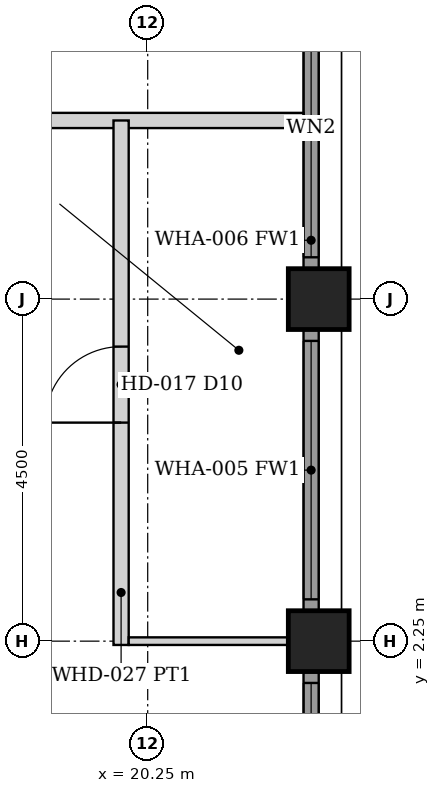
"""IFC4 building model, lengths in metres.
Left out: names, types, materials, properties, quantities, classifications, styles, units other than length and angle.
Written with IfcOpenShell. Run it as: python <this file> out.ifc"""

import sys

from ifc_helpers import new_model, si_unit, direction, frame, frame_2d, origin, origin_2d, place, context, subcontext, project, spatial, rectangle, hollow_rectangle, extrude, element, fill, save


model = new_model("IFC4")
c1 = context("Model", 3, precision=1e-05, world=origin(), true_north=direction((0.0, 1.0)))
c2 = subcontext(c1, "Body", "Model", "MODEL_VIEW")
j1 = project(units=[si_unit("LENGTHUNIT", "METRE"), si_unit("PLANEANGLEUNIT", "RADIAN")], contexts=[c1])
p1 = place(None, origin())
s1 = spatial("IfcSite", under=j1, at=p1, CompositionType="ELEMENT")
p2 = place(p1, origin())
s2 = spatial("IfcBuilding", under=s1, at=p2, CompositionType="ELEMENT")
p3 = place(p2, frame((0.0, 0.0, 150.8)))
s3 = spatial("IfcBuildingStorey", under=s2, at=p3, CompositionType="ELEMENT", Elevation=150.8)
for number, where, z_axis, x_axis in (
    (1, (22.5, 2.25, 0.0), (0.0, 0.0, 1.0), (1.0, 0.0, 0.0)),
    (2, (22.5, 6.75, 0.0), (0.0, 0.0, 1.0), (1.0, 0.0, 0.0)),
):
    element("IfcColumn", number, at=place(p3, frame(where, z_axis=z_axis, x_axis=x_axis)), inside=s3, PredefinedType="COLUMN", context=c2, shape_type="SweptSolid", body=[
        extrude(hollow_rectangle(XDim=0.8, YDim=0.8, WallThickness=0.05, at=origin_2d()), origin(), (0.0, 0.0, 1.0), 3.6),
    ])
p4 = place(p3, frame((22.4, -1.845, 0.0), z_axis=(0.0, 0.0, 1.0), x_axis=(0.0, 1.0, 0.0)))
e3 = element("IfcWall", 3, at=p4, inside=s3, PredefinedType="SOLIDWALL", context=c2, shape_type="SweptSolid", body=[
    extrude(rectangle(XDim=3.69, YDim=0.2, at=frame_2d((1.845, 0.0))), origin(), (0.0, 0.0, 1.0), 2.479),
])
p5 = place(p4, frame((0.145, 0.0, 0.3)))
e4 = element("IfcOpeningElement", 4, at=p5, cuts=e3, PredefinedType="OPENING", context=c2, shape_type="SweptSolid", body=[
    extrude(rectangle(XDim=3.4, YDim=2.029, at=frame_2d((1.7, 1.015))), frame((0.0, 0.11, 0.0), z_axis=(0.0, -1.0, 0.0), x_axis=(1.0, 0.0, 0.0)), (0.0, 0.0, 1.0), 0.22),
])
p6 = place(p3, frame((22.4, 2.655, 0.0), z_axis=(0.0, 0.0, 1.0), x_axis=(0.0, 1.0, 0.0)))
e5 = element("IfcWall", 5, at=p6, inside=s3, PredefinedType="SOLIDWALL", context=c2, shape_type="SweptSolid", body=[
    extrude(rectangle(XDim=3.69, YDim=0.2, at=frame_2d((1.845, 0.0))), origin(), (0.0, 0.0, 1.0), 2.479),
])
p7 = place(p6, frame((0.145, 0.0, 0.3)))
e6 = element("IfcOpeningElement", 6, at=p7, cuts=e5, PredefinedType="OPENING", context=c2, shape_type="SweptSolid", body=[
    extrude(rectangle(XDim=3.4, YDim=2.029, at=frame_2d((1.7, 1.015))), frame((0.0, 0.11, 0.0), z_axis=(0.0, -1.0, 0.0), x_axis=(1.0, 0.0, 0.0)), (0.0, 0.0, 1.0), 0.22),
])
p8 = place(p3, frame((22.4, 7.155, 0.0), z_axis=(0.0, 0.0, 1.0), x_axis=(0.0, 1.0, 0.0)))
e7 = element("IfcWall", 7, at=p8, inside=s3, PredefinedType="SOLIDWALL", context=c2, shape_type="SweptSolid", body=[
    extrude(rectangle(XDim=3.69, YDim=0.2, at=frame_2d((1.845, 0.0))), origin(), (0.0, 0.0, 1.0), 2.479),
])
p9 = place(p8, frame((0.145, 0.0, 0.3)))
e8 = element("IfcOpeningElement", 8, at=p9, cuts=e7, PredefinedType="OPENING", context=c2, shape_type="SweptSolid", body=[
    extrude(rectangle(XDim=3.4, YDim=2.029, at=frame_2d((1.7, 1.015))), frame((0.0, 0.11, 0.0), z_axis=(0.0, -1.0, 0.0), x_axis=(1.0, 0.0, 0.0)), (0.0, 0.0, 1.0), 0.22),
])
p10 = place(p3, frame((-22.3, 9.1, 0.0), z_axis=(0.0, 0.0, 1.0), x_axis=(1.0, 0.0, 0.0)))
e9 = element("IfcWall", 9, at=p10, inside=s3, PredefinedType="PARTITIONING", context=c2, shape_type="SweptSolid", body=[
    extrude(rectangle(XDim=44.6, YDim=0.2, at=frame_2d((22.3, 0.0))), origin(), (0.0, 0.0, 1.0), 2.473),
])
p11 = place(p10, frame((6.75, 0.0, 0.0)))
e10 = element("IfcOpeningElement", 10, at=p11, cuts=e9, PredefinedType="OPENING", context=c2, shape_type="SweptSolid", body=[
    extrude(rectangle(XDim=0.9, YDim=2.1, at=frame_2d((0.45, 1.05))), frame((0.0, 0.11, 0.0), z_axis=(0.0, -1.0, 0.0), x_axis=(1.0, 0.0, 0.0)), (0.0, 0.0, 1.0), 0.22),
])
p12 = place(p10, frame((11.25, 0.0, 0.0)))
e11 = element("IfcOpeningElement", 11, at=p12, cuts=e9, PredefinedType="OPENING", context=c2, shape_type="SweptSolid", body=[
    extrude(rectangle(XDim=0.9, YDim=2.1, at=frame_2d((0.45, 1.05))), frame((0.0, 0.11, 0.0), z_axis=(0.0, -1.0, 0.0), x_axis=(1.0, 0.0, 0.0)), (0.0, 0.0, 1.0), 0.22),
])
p13 = place(p10, frame((23.45, 0.0, 0.0)))
e12 = element("IfcOpeningElement", 12, at=p13, cuts=e9, PredefinedType="OPENING", context=c2, shape_type="SweptSolid", body=[
    extrude(rectangle(XDim=0.9, YDim=2.1, at=frame_2d((0.45, 1.05))), frame((0.0, 0.11, 0.0), z_axis=(0.0, -1.0, 0.0), x_axis=(1.0, 0.0, 0.0)), (0.0, 0.0, 1.0), 0.22),
])
p14 = place(p10, frame((32.45, 0.0, 0.0)))
e13 = element("IfcOpeningElement", 13, at=p14, cuts=e9, PredefinedType="OPENING", context=c2, shape_type="SweptSolid", body=[
    extrude(rectangle(XDim=0.9, YDim=2.1, at=frame_2d((0.45, 1.05))), frame((0.0, 0.11, 0.0), z_axis=(0.0, -1.0, 0.0), x_axis=(1.0, 0.0, 0.0)), (0.0, 0.0, 1.0), 0.22),
])
p15 = place(p10, frame((33.75, 0.0, 0.0)))
e14 = element("IfcOpeningElement", 14, at=p15, cuts=e9, PredefinedType="OPENING", context=c2, shape_type="SweptSolid", body=[
    extrude(rectangle(XDim=0.9, YDim=2.1, at=frame_2d((0.45, 1.05))), frame((0.0, 0.11, 0.0), z_axis=(0.0, -1.0, 0.0), x_axis=(1.0, 0.0, 0.0)), (0.0, 0.0, 1.0), 0.22),
])
p16 = place(p10, frame((38.85, 0.0, 0.0)))
e15 = element("IfcOpeningElement", 15, at=p16, cuts=e9, PredefinedType="OPENING", context=c2, shape_type="SweptSolid", body=[
    extrude(rectangle(XDim=0.9, YDim=2.1, at=frame_2d((0.45, 1.05))), frame((0.0, 0.11, 0.0), z_axis=(0.0, -1.0, 0.0), x_axis=(1.0, 0.0, 0.0)), (0.0, 0.0, 1.0), 0.22),
])
p17 = place(p10, frame((4.85, 0.0, 0.0)))
e16 = element("IfcOpeningElement", 16, at=p17, cuts=e9, PredefinedType="OPENING", context=c2, shape_type="SweptSolid", body=[
    extrude(rectangle(XDim=0.9, YDim=2.1, at=frame_2d((0.45, 1.05))), frame((0.0, 0.11, 0.0), z_axis=(0.0, -1.0, 0.0), x_axis=(1.0, 0.0, 0.0)), (0.0, 0.0, 1.0), 0.22),
])
p18 = place(p3, frame((19.9, 2.2, 0.0), z_axis=(0.0, 0.0, 1.0), x_axis=(0.0, 1.0, 0.0)))
e17 = element("IfcWall", 17, at=p18, inside=s3, PredefinedType="PARTITIONING", context=c2, shape_type="SweptSolid", body=[
    extrude(rectangle(XDim=6.9, YDim=0.2, at=frame_2d((3.45, 0.0))), origin(), (0.0, 0.0, 1.0), 2.473),
])
p19 = place(p18, frame((2.925, 0.0, 0.0)))
e18 = element("IfcOpeningElement", 18, at=p19, cuts=e17, PredefinedType="OPENING", context=c2, shape_type="SweptSolid", body=[
    extrude(rectangle(XDim=1.0, YDim=2.1, at=frame_2d((0.5, 1.05))), frame((0.0, 0.11, 0.0), z_axis=(0.0, -1.0, 0.0), x_axis=(1.0, 0.0, 0.0)), (0.0, 0.0, 1.0), 0.22),
])
p20 = place(p3, frame((20.0, 2.25, 0.0), z_axis=(0.0, 0.0, 1.0), x_axis=(1.0, 0.0, 0.0)))
e19 = element("IfcWall", 19, at=p20, inside=s3, PredefinedType="PARTITIONING", context=c2, shape_type="SweptSolid", body=[
    extrude(rectangle(XDim=2.1, YDim=0.1, at=frame_2d((1.05, 0.0))), origin(), (0.0, 0.0, 1.0), 2.473),
])
p21 = place(p5, origin())
e20 = element("IfcWindow", 20, at=p21, inside=s3, PartitioningType="SINGLE_PANEL", PredefinedType="WINDOW", context=c2, shape_type="SweptSolid", body=[
    extrude(rectangle(XDim=3.4, YDim=2.029, at=frame_2d((1.7, 1.015))), frame((0.0, 0.03, 0.0), z_axis=(0.0, -1.0, 0.0), x_axis=(1.0, 0.0, 0.0)), (0.0, 0.0, 1.0), 0.06),
])
fill(e4, e20)
p22 = place(p7, origin())
e21 = element("IfcWindow", 21, at=p22, inside=s3, PartitioningType="SINGLE_PANEL", PredefinedType="WINDOW", context=c2, shape_type="SweptSolid", body=[
    extrude(rectangle(XDim=3.4, YDim=2.029, at=frame_2d((1.7, 1.015))), frame((0.0, 0.03, 0.0), z_axis=(0.0, -1.0, 0.0), x_axis=(1.0, 0.0, 0.0)), (0.0, 0.0, 1.0), 0.06),
])
fill(e6, e21)
p23 = place(p9, origin())
e22 = element("IfcWindow", 22, at=p23, inside=s3, PartitioningType="SINGLE_PANEL", PredefinedType="WINDOW", context=c2, shape_type="SweptSolid", body=[
    extrude(rectangle(XDim=3.4, YDim=2.029, at=frame_2d((1.7, 1.015))), frame((0.0, 0.03, 0.0), z_axis=(0.0, -1.0, 0.0), x_axis=(1.0, 0.0, 0.0)), (0.0, 0.0, 1.0), 0.06),
])
fill(e8, e22)
p24 = place(p19, origin())
e23 = element("IfcDoor", 23, at=p24, inside=s3, OperationType="SINGLE_SWING_LEFT", PredefinedType="DOOR", context=c2, shape_type="SweptSolid", body=[
    extrude(rectangle(XDim=1.0, YDim=2.1, at=frame_2d((0.5, 1.05))), frame((0.0, 0.025, 0.0), z_axis=(0.0, -1.0, 0.0), x_axis=(1.0, 0.0, 0.0)), (0.0, 0.0, 1.0), 0.05),
])
fill(e18, e23)
save(model, sys.argv[1])
